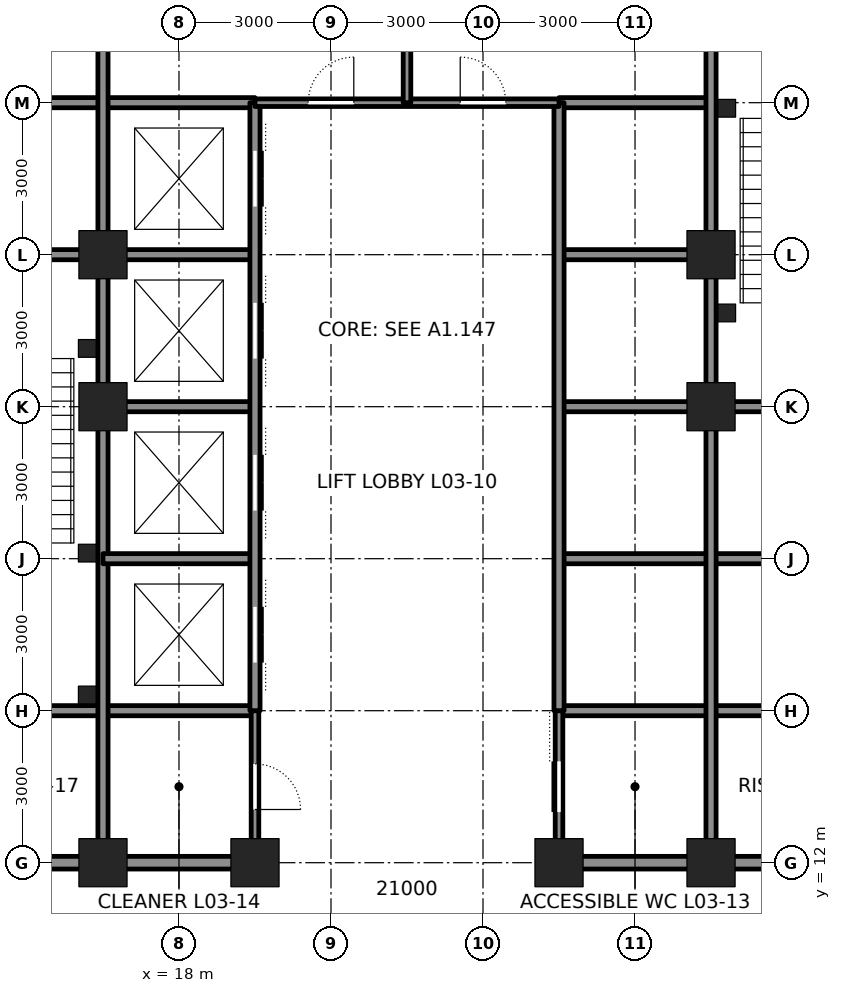
"""IFC4 building model, lengths in metres.
Left out: names, types, materials, properties, quantities, classifications, styles, units other than length and angle.
Written with IfcOpenShell. Run it as: python <this file> out.ifc"""

import sys

from ifc_helpers import new_model, si_unit, direction, frame, frame_2d, origin, origin_2d, place, context, subcontext, project, spatial, rectangle, hollow_rectangle, extrude, element, fill, save


model = new_model("IFC4")
c1 = context("Model", 3, precision=1e-05, world=origin(), true_north=direction((0.0, 1.0)))
c2 = subcontext(c1, "Body", "Model", "MODEL_VIEW")
j1 = project(units=[si_unit("LENGTHUNIT", "METRE"), si_unit("PLANEANGLEUNIT", "RADIAN")], contexts=[c1])
p1 = place(None, origin())
s1 = spatial("IfcSite", under=j1, at=p1, CompositionType="ELEMENT")
p2 = place(p1, origin())
s2 = spatial("IfcBuilding", under=s1, at=p2, CompositionType="ELEMENT")
p3 = place(p2, frame((0.0, 0.0, 19.5)))
s3 = spatial("IfcBuildingStorey", under=s2, at=p3, CompositionType="ELEMENT", Elevation=19.5)
for number, where, z_axis, x_axis in (
    (1, (16.5, 12.0, 0.0), (0.0, 0.0, 1.0), (1.0, 0.0, 0.0)),
    (2, (19.5, 12.0, 0.0), (0.0, 0.0, 1.0), (1.0, 0.0, 0.0)),
    (3, (25.5, 12.0, 0.0), (0.0, 0.0, 1.0), (1.0, 0.0, 0.0)),
    (4, (28.5, 12.0, 0.0), (0.0, 0.0, 1.0), (1.0, 0.0, 0.0)),
    (5, (16.5, 21.0, 0.0), (0.0, 0.0, 1.0), (1.0, 0.0, 0.0)),
    (6, (16.5, 24.0, 0.0), (0.0, 0.0, 1.0), (1.0, 0.0, 0.0)),
    (7, (28.5, 21.0, 0.0), (0.0, 0.0, 1.0), (1.0, 0.0, 0.0)),
    (8, (28.5, 24.0, 0.0), (0.0, 0.0, 1.0), (1.0, 0.0, 0.0)),
):
    element("IfcColumn", number, at=place(p3, frame(where, z_axis=z_axis, x_axis=x_axis)), inside=s3, PredefinedType="COLUMN", context=c2, shape_type="SweptSolid", body=[
        extrude(hollow_rectangle(XDim=0.95, YDim=0.95, WallThickness=0.095, at=origin_2d()), origin(), (0.0, 0.0, 1.0), 4.8),
    ])
p4 = place(p3, frame((12.25, 12.0, 0.0), z_axis=(0.0, 0.0, 1.0), x_axis=(1.0, 0.0, 0.0)))
e9 = element("IfcWall", 9, at=p4, inside=s3, PredefinedType="SOLIDWALL", context=c2, shape_type="SweptSolid", body=[
    extrude(rectangle(XDim=4.0, YDim=0.25, at=frame_2d((2.0, 0.0))), origin(), (0.0, 0.0, 1.0), 3.481),
])
for number, where, z_axis, x_axis in (
    (10, (16.75, 12.0, 0.0), (0.0, 0.0, 1.0), (1.0, 0.0, 0.0)),
    (11, (25.75, 12.0, 0.0), (0.0, 0.0, 1.0), (1.0, 0.0, 0.0)),
):
    element("IfcWall", number, at=place(p3, frame(where, z_axis=z_axis, x_axis=x_axis)), inside=s3, PredefinedType="SOLIDWALL", context=c2, shape_type="SweptSolid", body=[
        extrude(rectangle(XDim=2.5, YDim=0.25, at=frame_2d((1.25, 0.0))), origin(), (0.0, 0.0, 1.0), 3.481),
    ])
p5 = place(p3, frame((28.75, 12.0, 0.0), z_axis=(0.0, 0.0, 1.0), x_axis=(1.0, 0.0, 0.0)))
e12 = element("IfcWall", 12, at=p5, inside=s3, PredefinedType="SOLIDWALL", context=c2, shape_type="SweptSolid", body=[
    extrude(rectangle(XDim=4.0, YDim=0.25, at=frame_2d((2.0, 0.0))), origin(), (0.0, 0.0, 1.0), 3.481),
])
for number, where, z_axis, x_axis in (
    (13, (12.0, 15.0, 0.0), (0.0, 0.0, 1.0), (1.0, 0.0, 0.0)),
    (14, (25.5, 15.0, 0.0), (0.0, 0.0, 1.0), (1.0, 0.0, 0.0)),
):
    element("IfcWall", number, at=place(p3, frame(where, z_axis=z_axis, x_axis=x_axis)), inside=s3, PredefinedType="SOLIDWALL", context=c2, shape_type="SweptSolid", body=[
        extrude(rectangle(XDim=7.5, YDim=0.2, at=frame_2d((3.75, 0.0))), origin(), (0.0, 0.0, 1.0), 4.64),
    ])
p6 = place(p3, frame((12.25, 24.0, 0.0), z_axis=(0.0, 0.0, 1.0), x_axis=(1.0, 0.0, 0.0)))
e15 = element("IfcWall", 15, at=p6, inside=s3, PredefinedType="SOLIDWALL", context=c2, shape_type="SweptSolid", body=[
    extrude(rectangle(XDim=4.0, YDim=0.2, at=frame_2d((2.0, 0.0))), origin(), (0.0, 0.0, 1.0), 3.69),
])
p7 = place(p6, frame((1.4, 0.0, 0.0)))
e16 = element("IfcOpeningElement", 16, at=p7, cuts=e15, PredefinedType="OPENING", context=c2, shape_type="SweptSolid", body=[
    extrude(rectangle(XDim=1.2, YDim=2.1, at=frame_2d((0.6, 1.05))), frame((0.0, 0.11, 0.0), z_axis=(0.0, -1.0, 0.0), x_axis=(1.0, 0.0, 0.0)), (0.0, 0.0, 1.0), 0.22),
])
for number, where, z_axis, x_axis in (
    (17, (16.75, 24.0, 0.0), (0.0, 0.0, 1.0), (1.0, 0.0, 0.0)),
    (18, (25.5, 24.0, 0.0), (0.0, 0.0, 1.0), (1.0, 0.0, 0.0)),
):
    element("IfcWall", number, at=place(p3, frame(where, z_axis=z_axis, x_axis=x_axis)), inside=s3, PredefinedType="SOLIDWALL", context=c2, shape_type="SweptSolid", body=[
        extrude(rectangle(XDim=2.75, YDim=0.2, at=frame_2d((1.375, 0.0))), origin(), (0.0, 0.0, 1.0), 3.69),
    ])
p8 = place(p3, frame((12.0, 27.0, 0.0), z_axis=(0.0, 0.0, 1.0), x_axis=(1.0, 0.0, 0.0)))
e19 = element("IfcWall", 19, at=p8, inside=s3, PredefinedType="SOLIDWALL", context=c2, shape_type="SweptSolid", body=[
    extrude(rectangle(XDim=7.5, YDim=0.2, at=frame_2d((3.75, 0.0))), origin(), (0.0, 0.0, 1.0), 4.64),
])
p9 = place(p8, frame((1.65, 0.0, 0.0)))
e20 = element("IfcOpeningElement", 20, at=p9, cuts=e19, PredefinedType="OPENING", context=c2, shape_type="SweptSolid", body=[
    extrude(rectangle(XDim=1.2, YDim=2.1, at=frame_2d((0.6, 1.05))), frame((0.0, 0.11, 0.0), z_axis=(0.0, -1.0, 0.0), x_axis=(1.0, 0.0, 0.0)), (0.0, 0.0, 1.0), 0.22),
])
p10 = place(p3, frame((25.5, 27.0, 0.0), z_axis=(0.0, 0.0, 1.0), x_axis=(1.0, 0.0, 0.0)))
e21 = element("IfcWall", 21, at=p10, inside=s3, PredefinedType="SOLIDWALL", context=c2, shape_type="SweptSolid", body=[
    extrude(rectangle(XDim=3.0, YDim=0.2, at=frame_2d((1.5, 0.0))), origin(), (0.0, 0.0, 1.0), 4.64),
])
p11 = place(p3, frame((16.5, 12.25, 0.0), z_axis=(0.0, 0.0, 1.0), x_axis=(0.0, 1.0, 0.0)))
e22 = element("IfcWall", 22, at=p11, inside=s3, PredefinedType="SOLIDWALL", context=c2, shape_type="SweptSolid", body=[
    extrude(rectangle(XDim=8.5, YDim=0.2, at=frame_2d((4.25, 0.0))), origin(), (0.0, 0.0, 1.0), 3.713),
])
p12 = place(p3, frame((16.5, 21.25, 0.0), z_axis=(0.0, 0.0, 1.0), x_axis=(0.0, 1.0, 0.0)))
e23 = element("IfcWall", 23, at=p12, inside=s3, PredefinedType="SOLIDWALL", context=c2, shape_type="SweptSolid", body=[
    extrude(rectangle(XDim=2.5, YDim=0.2, at=frame_2d((1.25, 0.0))), origin(), (0.0, 0.0, 1.0), 3.713),
])
p13 = place(p3, frame((16.5, 24.25, 0.0), z_axis=(0.0, 0.0, 1.0), x_axis=(0.0, 1.0, 0.0)))
e24 = element("IfcWall", 24, at=p13, inside=s3, PredefinedType="SOLIDWALL", context=c2, shape_type="SweptSolid", body=[
    extrude(rectangle(XDim=8.5, YDim=0.2, at=frame_2d((4.25, 0.0))), origin(), (0.0, 0.0, 1.0), 3.713),
])
p14 = place(p3, frame((16.5, 18.0, 0.0), z_axis=(0.0, 0.0, 1.0), x_axis=(1.0, 0.0, 0.0)))
e25 = element("IfcWall", 25, at=p14, inside=s3, PredefinedType="SOLIDWALL", context=c2, shape_type="SweptSolid", body=[
    extrude(rectangle(XDim=3.0, YDim=0.2, at=frame_2d((1.5, 0.0))), origin(), (0.0, 0.0, 1.0), 4.64),
])
p15 = place(p3, frame((25.5, 18.0, 0.0), z_axis=(0.0, 0.0, 1.0), x_axis=(1.0, 0.0, 0.0)))
e26 = element("IfcWall", 26, at=p15, inside=s3, PredefinedType="SOLIDWALL", context=c2, shape_type="SweptSolid", body=[
    extrude(rectangle(XDim=7.5, YDim=0.2, at=frame_2d((3.75, 0.0))), origin(), (0.0, 0.0, 1.0), 4.64),
])
p16 = place(p15, frame((4.65, 0.0, 0.0)))
e27 = element("IfcOpeningElement", 27, at=p16, cuts=e26, PredefinedType="OPENING", context=c2, shape_type="SweptSolid", body=[
    extrude(rectangle(XDim=1.2, YDim=2.1, at=frame_2d((0.6, 1.05))), frame((0.0, 0.11, 0.0), z_axis=(0.0, -1.0, 0.0), x_axis=(1.0, 0.0, 0.0)), (0.0, 0.0, 1.0), 0.22),
])
for number, where, z_axis, x_axis in (
    (28, (16.75, 21.0, 0.0), (0.0, 0.0, 1.0), (1.0, 0.0, 0.0)),
    (29, (25.5, 21.0, 0.0), (0.0, 0.0, 1.0), (1.0, 0.0, 0.0)),
):
    element("IfcWall", number, at=place(p3, frame(where, z_axis=z_axis, x_axis=x_axis)), inside=s3, PredefinedType="SOLIDWALL", context=c2, shape_type="SweptSolid", body=[
        extrude(rectangle(XDim=2.75, YDim=0.2, at=frame_2d((1.375, 0.0))), origin(), (0.0, 0.0, 1.0), 3.69),
    ])
p17 = place(p3, frame((28.75, 21.0, 0.0), z_axis=(0.0, 0.0, 1.0), x_axis=(1.0, 0.0, 0.0)))
e30 = element("IfcWall", 30, at=p17, inside=s3, PredefinedType="SOLIDWALL", context=c2, shape_type="SweptSolid", body=[
    extrude(rectangle(XDim=4.0, YDim=0.2, at=frame_2d((2.0, 0.0))), origin(), (0.0, 0.0, 1.0), 3.69),
])
p18 = place(p17, frame((1.4, 0.0, 0.0)))
e31 = element("IfcOpeningElement", 31, at=p18, cuts=e30, PredefinedType="OPENING", context=c2, shape_type="SweptSolid", body=[
    extrude(rectangle(XDim=1.2, YDim=2.1, at=frame_2d((0.6, 1.05))), frame((0.0, 0.11, 0.0), z_axis=(0.0, -1.0, 0.0), x_axis=(1.0, 0.0, 0.0)), (0.0, 0.0, 1.0), 0.22),
])
p19 = place(p3, frame((19.5, 12.25, 0.0), z_axis=(0.0, 0.0, 1.0), x_axis=(0.0, 1.0, 0.0)))
e32 = element("IfcWall", 32, at=p19, inside=s3, PredefinedType="PARTITIONING", context=c2, shape_type="SweptSolid", body=[
    extrude(rectangle(XDim=2.75, YDim=0.15, at=frame_2d((1.375, 0.0))), origin(), (0.0, 0.0, 1.0), 3.665),
])
p20 = place(p19, frame((0.8, 0.0, 0.0)))
e33 = element("IfcOpeningElement", 33, at=p20, cuts=e32, PredefinedType="OPENING", context=c2, shape_type="SweptSolid", body=[
    extrude(rectangle(XDim=0.9, YDim=2.1, at=frame_2d((0.45, 1.05))), frame((0.0, 0.085, 0.0), z_axis=(0.0, -1.0, 0.0), x_axis=(1.0, 0.0, 0.0)), (0.0, 0.0, 1.0), 0.17),
])
p21 = place(p3, frame((19.5, 15.0, 0.0), z_axis=(0.0, 0.0, 1.0), x_axis=(0.0, 1.0, 0.0)))
e34 = element("IfcWall", 34, at=p21, inside=s3, PredefinedType="SOLIDWALL", context=c2, shape_type="SweptSolid", body=[
    extrude(rectangle(XDim=12.0, YDim=0.2, at=frame_2d((6.0, 0.0))), origin(), (0.0, 0.0, 1.0), 3.665),
])
p22 = place(p21, frame((0.95, 0.0, 0.0)))
e35 = element("IfcOpeningElement", 35, at=p22, cuts=e34, PredefinedType="OPENING", context=c2, shape_type="SweptSolid", body=[
    extrude(rectangle(XDim=1.1, YDim=2.1, at=frame_2d((0.55, 1.05))), frame((0.0, 0.11, 0.0), z_axis=(0.0, -1.0, 0.0), x_axis=(1.0, 0.0, 0.0)), (0.0, 0.0, 1.0), 0.22),
])
p23 = place(p21, frame((3.95, 0.0, 0.0)))
e36 = element("IfcOpeningElement", 36, at=p23, cuts=e34, PredefinedType="OPENING", context=c2, shape_type="SweptSolid", body=[
    extrude(rectangle(XDim=1.1, YDim=2.1, at=frame_2d((0.55, 1.05))), frame((0.0, 0.11, 0.0), z_axis=(0.0, -1.0, 0.0), x_axis=(1.0, 0.0, 0.0)), (0.0, 0.0, 1.0), 0.22),
])
p24 = place(p21, frame((6.95, 0.0, 0.0)))
e37 = element("IfcOpeningElement", 37, at=p24, cuts=e34, PredefinedType="OPENING", context=c2, shape_type="SweptSolid", body=[
    extrude(rectangle(XDim=1.1, YDim=2.1, at=frame_2d((0.55, 1.05))), frame((0.0, 0.11, 0.0), z_axis=(0.0, -1.0, 0.0), x_axis=(1.0, 0.0, 0.0)), (0.0, 0.0, 1.0), 0.22),
])
p25 = place(p21, frame((9.95, 0.0, 0.0)))
e38 = element("IfcOpeningElement", 38, at=p25, cuts=e34, PredefinedType="OPENING", context=c2, shape_type="SweptSolid", body=[
    extrude(rectangle(XDim=1.1, YDim=2.1, at=frame_2d((0.55, 1.05))), frame((0.0, 0.11, 0.0), z_axis=(0.0, -1.0, 0.0), x_axis=(1.0, 0.0, 0.0)), (0.0, 0.0, 1.0), 0.22),
])
p26 = place(p3, frame((25.5, 12.25, 0.0), z_axis=(0.0, 0.0, 1.0), x_axis=(0.0, 1.0, 0.0)))
e39 = element("IfcWall", 39, at=p26, inside=s3, PredefinedType="PARTITIONING", context=c2, shape_type="SweptSolid", body=[
    extrude(rectangle(XDim=2.75, YDim=0.15, at=frame_2d((1.375, 0.0))), origin(), (0.0, 0.0, 1.0), 3.665),
])
p27 = place(p26, frame((0.75, 0.0, 0.0)))
e40 = element("IfcOpeningElement", 40, at=p27, cuts=e39, PredefinedType="OPENING", context=c2, shape_type="SweptSolid", body=[
    extrude(rectangle(XDim=1.0, YDim=2.1, at=frame_2d((0.5, 1.05))), frame((0.0, 0.085, 0.0), z_axis=(0.0, -1.0, 0.0), x_axis=(1.0, 0.0, 0.0)), (0.0, 0.0, 1.0), 0.17),
])
p28 = place(p3, frame((25.5, 15.0, 0.0), z_axis=(0.0, 0.0, 1.0), x_axis=(0.0, 1.0, 0.0)))
e41 = element("IfcWall", 41, at=p28, inside=s3, PredefinedType="SOLIDWALL", context=c2, shape_type="SweptSolid", body=[
    extrude(rectangle(XDim=12.0, YDim=0.2, at=frame_2d((6.0, 0.0))), origin(), (0.0, 0.0, 1.0), 3.665),
])
p29 = place(p3, frame((28.5, 12.25, 0.0), z_axis=(0.0, 0.0, 1.0), x_axis=(0.0, 1.0, 0.0)))
e42 = element("IfcWall", 42, at=p29, inside=s3, PredefinedType="SOLIDWALL", context=c2, shape_type="SweptSolid", body=[
    extrude(rectangle(XDim=8.5, YDim=0.2, at=frame_2d((4.25, 0.0))), origin(), (0.0, 0.0, 1.0), 3.713),
])
p30 = place(p3, frame((28.5, 21.25, 0.0), z_axis=(0.0, 0.0, 1.0), x_axis=(0.0, 1.0, 0.0)))
e43 = element("IfcWall", 43, at=p30, inside=s3, PredefinedType="SOLIDWALL", context=c2, shape_type="SweptSolid", body=[
    extrude(rectangle(XDim=2.5, YDim=0.2, at=frame_2d((1.25, 0.0))), origin(), (0.0, 0.0, 1.0), 3.713),
])
p31 = place(p3, frame((28.5, 24.25, 0.0), z_axis=(0.0, 0.0, 1.0), x_axis=(0.0, 1.0, 0.0)))
e44 = element("IfcWall", 44, at=p31, inside=s3, PredefinedType="SOLIDWALL", context=c2, shape_type="SweptSolid", body=[
    extrude(rectangle(XDim=8.5, YDim=0.2, at=frame_2d((4.25, 0.0))), origin(), (0.0, 0.0, 1.0), 3.713),
])
p32 = place(p3, frame((19.5, 27.0, 0.0), z_axis=(0.0, 0.0, 1.0), x_axis=(1.0, 0.0, 0.0)))
e45 = element("IfcWall", 45, at=p32, inside=s3, PredefinedType="PARTITIONING", context=c2, shape_type="SweptSolid", body=[
    extrude(rectangle(XDim=6.0, YDim=0.15, at=frame_2d((3.0, 0.0))), origin(), (0.0, 0.0, 1.0), 4.64),
])
p33 = place(p32, frame((1.05, 0.0, 0.0)))
e46 = element("IfcOpeningElement", 46, at=p33, cuts=e45, PredefinedType="OPENING", context=c2, shape_type="SweptSolid", body=[
    extrude(rectangle(XDim=0.9, YDim=2.1, at=frame_2d((0.45, 1.05))), frame((0.0, 0.085, 0.0), z_axis=(0.0, -1.0, 0.0), x_axis=(1.0, 0.0, 0.0)), (0.0, 0.0, 1.0), 0.17),
])
p34 = place(p32, frame((4.05, 0.0, 0.0)))
e47 = element("IfcOpeningElement", 47, at=p34, cuts=e45, PredefinedType="OPENING", context=c2, shape_type="SweptSolid", body=[
    extrude(rectangle(XDim=0.9, YDim=2.1, at=frame_2d((0.45, 1.05))), frame((0.0, 0.085, 0.0), z_axis=(0.0, -1.0, 0.0), x_axis=(1.0, 0.0, 0.0)), (0.0, 0.0, 1.0), 0.17),
])
p35 = place(p3, frame((22.5, 27.0, 0.0), z_axis=(0.0, 0.0, 1.0), x_axis=(0.0, 1.0, 0.0)))
e48 = element("IfcWall", 48, at=p35, inside=s3, PredefinedType="PARTITIONING", context=c2, shape_type="SweptSolid", body=[
    extrude(rectangle(XDim=6.0, YDim=0.15, at=frame_2d((3.0, 0.0))), origin(), (0.0, 0.0, 1.0), 4.64),
])
for number, where, z_axis, x_axis in (
    (49, (16.19, 15.31, 0.0), (0.0, 0.0, 1.0), (1.0, 0.0, 0.0)),
    (50, (16.19, 18.11, 0.0), (0.0, 0.0, 1.0), (1.0, 0.0, 0.0)),
    (51, (16.19, 22.15, 0.0), (0.0, 0.0, 1.0), (1.0, 0.0, 0.0)),
    (52, (28.81, 26.89, 0.0), (0.0, 0.0, 1.0), (1.0, 0.0, 0.0)),
    (53, (28.81, 22.85, 0.0), (0.0, 0.0, 1.0), (1.0, 0.0, 0.0)),
):
    element("IfcColumn", number, at=place(p3, frame(where, z_axis=z_axis, x_axis=x_axis)), inside=s3, PredefinedType="COLUMN", context=c2, shape_type="SweptSolid", body=[
        extrude(hollow_rectangle(XDim=0.35, YDim=0.35, WallThickness=0.035, at=origin_2d()), origin(), (0.0, 0.0, 1.0), 4.8),
    ])
p36 = place(p33, origin())
e54 = element("IfcDoor", 54, at=p36, inside=s3, OperationType="SINGLE_SWING_RIGHT", PredefinedType="DOOR", context=c2, shape_type="SweptSolid", body=[
    extrude(rectangle(XDim=0.9, YDim=2.1, at=frame_2d((0.45, 1.05))), frame((0.0, 0.025, 0.0), z_axis=(0.0, -1.0, 0.0), x_axis=(1.0, 0.0, 0.0)), (0.0, 0.0, 1.0), 0.05),
])
fill(e46, e54)
p37 = place(p34, origin())
e55 = element("IfcDoor", 55, at=p37, inside=s3, OperationType="SINGLE_SWING_LEFT", PredefinedType="DOOR", context=c2, shape_type="SweptSolid", body=[
    extrude(rectangle(XDim=0.9, YDim=2.1, at=frame_2d((0.45, 1.05))), frame((0.0, 0.025, 0.0), z_axis=(0.0, -1.0, 0.0), x_axis=(1.0, 0.0, 0.0)), (0.0, 0.0, 1.0), 0.05),
])
fill(e47, e55)
p38 = place(p27, origin())
e56 = element("IfcDoor", 56, at=p38, inside=s3, OperationType="SLIDING_TO_LEFT", PredefinedType="DOOR", context=c2, shape_type="SweptSolid", body=[
    extrude(rectangle(XDim=1.0, YDim=2.1, at=frame_2d((0.5, 1.05))), frame((0.0, 0.025, 0.0), z_axis=(0.0, -1.0, 0.0), x_axis=(1.0, 0.0, 0.0)), (0.0, 0.0, 1.0), 0.05),
])
fill(e40, e56)
p39 = place(p20, frame((0.9, 0.0, 0.0), z_axis=(0.0, 0.0, 1.0), x_axis=(-1.0, 0.0, 0.0)))
e57 = element("IfcDoor", 57, at=p39, inside=s3, OperationType="SINGLE_SWING_RIGHT", PredefinedType="DOOR", context=c2, shape_type="SweptSolid", body=[
    extrude(rectangle(XDim=0.9, YDim=2.1, at=frame_2d((0.45, 1.05))), frame((0.0, 0.025, 0.0), z_axis=(0.0, -1.0, 0.0), x_axis=(1.0, 0.0, 0.0)), (0.0, 0.0, 1.0), 0.05),
])
fill(e33, e57)
p40 = place(p22, origin())
e58 = element("IfcDoor", 58, at=p40, inside=s3, OperationType="DOUBLE_DOOR_SLIDING", PredefinedType="DOOR", context=c2, shape_type="SweptSolid", body=[
    extrude(rectangle(XDim=1.1, YDim=2.1, at=frame_2d((0.55, 1.05))), frame((0.0, 0.025, 0.0), z_axis=(0.0, -1.0, 0.0), x_axis=(1.0, 0.0, 0.0)), (0.0, 0.0, 1.0), 0.05),
])
fill(e35, e58)
p41 = place(p23, origin())
e59 = element("IfcDoor", 59, at=p41, inside=s3, OperationType="DOUBLE_DOOR_SLIDING", PredefinedType="DOOR", context=c2, shape_type="SweptSolid", body=[
    extrude(rectangle(XDim=1.1, YDim=2.1, at=frame_2d((0.55, 1.05))), frame((0.0, 0.025, 0.0), z_axis=(0.0, -1.0, 0.0), x_axis=(1.0, 0.0, 0.0)), (0.0, 0.0, 1.0), 0.05),
])
fill(e36, e59)
p42 = place(p24, origin())
e60 = element("IfcDoor", 60, at=p42, inside=s3, OperationType="DOUBLE_DOOR_SLIDING", PredefinedType="DOOR", context=c2, shape_type="SweptSolid", body=[
    extrude(rectangle(XDim=1.1, YDim=2.1, at=frame_2d((0.55, 1.05))), frame((0.0, 0.025, 0.0), z_axis=(0.0, -1.0, 0.0), x_axis=(1.0, 0.0, 0.0)), (0.0, 0.0, 1.0), 0.05),
])
fill(e37, e60)
p43 = place(p25, origin())
e61 = element("IfcDoor", 61, at=p43, inside=s3, OperationType="DOUBLE_DOOR_SLIDING", PredefinedType="DOOR", context=c2, shape_type="SweptSolid", body=[
    extrude(rectangle(XDim=1.1, YDim=2.1, at=frame_2d((0.55, 1.05))), frame((0.0, 0.025, 0.0), z_axis=(0.0, -1.0, 0.0), x_axis=(1.0, 0.0, 0.0)), (0.0, 0.0, 1.0), 0.05),
])
fill(e38, e61)
save(model, sys.argv[1])
